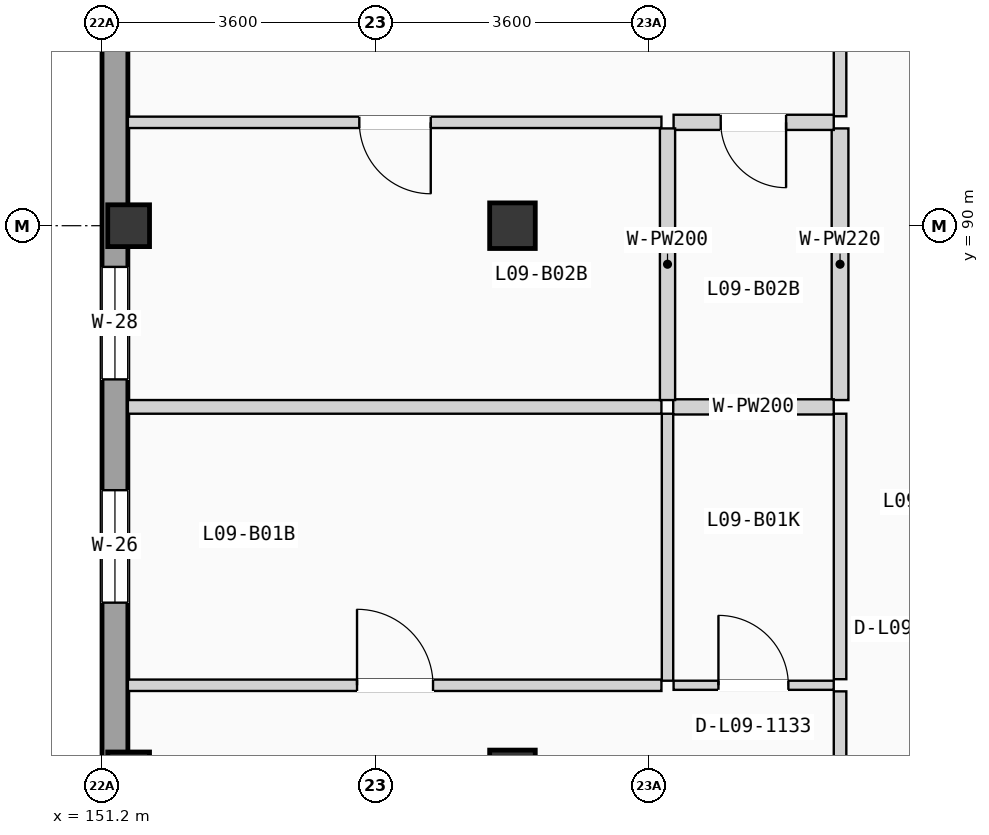
"""IFC4 building model, lengths in metres.
Left out: names, types, materials, properties, quantities, classifications, styles, units other than length and angle.
Written with IfcOpenShell. Run it as: python <this file> out.ifc"""

import sys

from ifc_helpers import new_model, si_unit, direction, frame, frame_2d, origin, origin_2d, place, context, subcontext, project, spatial, rectangle, extrude, element, fill, save


model = new_model("IFC4")
c1 = context("Model", 3, precision=1e-05, world=origin(), true_north=direction((0.0, 1.0)))
c2 = subcontext(c1, "Body", "Model", "MODEL_VIEW")
j1 = project(units=[si_unit("LENGTHUNIT", "METRE"), si_unit("PLANEANGLEUNIT", "RADIAN")], contexts=[c1])
p1 = place(None, origin())
s1 = spatial("IfcSite", under=j1, at=p1, CompositionType="ELEMENT")
p2 = place(p1, origin())
s2 = spatial("IfcBuilding", under=s1, at=p2, CompositionType="ELEMENT")
p3 = place(p2, frame((0.0, 0.0, 30.975)))
s3 = spatial("IfcBuildingStorey", under=s2, at=p3, CompositionType="ELEMENT", Elevation=30.975)
for number, where, z_axis, x_axis in (
    (1, (151.55, 82.8, 0.0), (0.0, 0.0, 1.0), (1.0, 0.0, 0.0)),
    (2, (151.55, 90.0, 0.0), (0.0, 0.0, 1.0), (1.0, 0.0, 0.0)),
):
    element("IfcColumn", number, at=place(p3, frame(where, z_axis=z_axis, x_axis=x_axis)), inside=s3, PredefinedType="COLUMN", context=c2, shape_type="SweptSolid", body=[
        extrude(rectangle(XDim=0.55, YDim=0.55, at=origin_2d()), origin(), (0.0, 0.0, 1.0), 3.15),
    ])
for number, where, z_axis, x_axis in (
    (3, (156.6, 82.8, 0.0), (0.0, 0.0, 1.0), (1.0, 0.0, 0.0)),
    (4, (156.6, 90.0, 0.0), (0.0, 0.0, 1.0), (1.0, 0.0, 0.0)),
):
    element("IfcColumn", number, at=place(p3, frame(where, z_axis=z_axis, x_axis=x_axis)), inside=s3, PredefinedType="COLUMN", context=c2, shape_type="SweptSolid", body=[
        extrude(rectangle(XDim=0.6, YDim=0.6, at=origin_2d()), origin(), (0.0, 0.0, 1.0), 3.15),
    ])
p4 = place(p3, frame((151.37, 68.74, 0.0), z_axis=(0.0, 0.0, 1.0), x_axis=(0.0, 1.0, 0.0)))
e5 = element("IfcWall", 5, at=p4, inside=s3, PredefinedType="SOLIDWALL", context=c2, shape_type="SweptSolid", body=[
    extrude(rectangle(XDim=49.72, YDim=0.34, at=frame_2d((24.86, 0.0))), origin(), (0.0, 0.0, 1.0), 2.9),
])
p5 = place(p4, frame((11.677, 0.0, 0.565)))
e6 = element("IfcOpeningElement", 6, at=p5, cuts=e5, PredefinedType="OPENING", context=c2, shape_type="SweptSolid", body=[
    extrude(rectangle(XDim=1.35, YDim=1.65, at=frame_2d((0.675, 0.825))), frame((0.0, 0.18, 0.0), z_axis=(0.0, -1.0, 0.0), x_axis=(1.0, 0.0, 0.0)), (0.0, 0.0, 1.0), 0.36),
])
p6 = place(p4, frame((8.532, 0.0, 0.85)))
e7 = element("IfcOpeningElement", 7, at=p6, cuts=e5, PredefinedType="OPENING", context=c2, shape_type="SweptSolid", body=[
    extrude(rectangle(XDim=0.95, YDim=1.2, at=frame_2d((0.475, 0.6))), frame((0.0, 0.18, 0.0), z_axis=(0.0, -1.0, 0.0), x_axis=(1.0, 0.0, 0.0)), (0.0, 0.0, 1.0), 0.36),
])
p7 = place(p4, frame((16.3, 0.0, 0.9)))
e8 = element("IfcOpeningElement", 8, at=p7, cuts=e5, PredefinedType="OPENING", context=c2, shape_type="SweptSolid", body=[
    extrude(rectangle(XDim=1.48, YDim=1.2, at=frame_2d((0.74, 0.6))), frame((0.0, 0.18, 0.0), z_axis=(0.0, -1.0, 0.0), x_axis=(1.0, 0.0, 0.0)), (0.0, 0.0, 1.0), 0.36),
])
p8 = place(p4, frame((24.12, 0.0, 0.865)))
e9 = element("IfcOpeningElement", 9, at=p8, cuts=e5, PredefinedType="OPENING", context=c2, shape_type="SweptSolid", body=[
    extrude(rectangle(XDim=1.48, YDim=1.35, at=frame_2d((0.74, 0.675))), frame((0.0, 0.18, 0.0), z_axis=(0.0, -1.0, 0.0), x_axis=(1.0, 0.0, 0.0)), (0.0, 0.0, 1.0), 0.36),
])
p9 = place(p4, frame((19.238, 0.0, 0.715)))
e10 = element("IfcOpeningElement", 10, at=p9, cuts=e5, PredefinedType="OPENING", context=c2, shape_type="SweptSolid", body=[
    extrude(rectangle(XDim=1.48, YDim=1.5, at=frame_2d((0.74, 0.75))), frame((0.0, 0.18, 0.0), z_axis=(0.0, -1.0, 0.0), x_axis=(1.0, 0.0, 0.0)), (0.0, 0.0, 1.0), 0.36),
])
p10 = place(p4, frame((29.002, 0.0, 0.565)))
e11 = element("IfcOpeningElement", 11, at=p10, cuts=e5, PredefinedType="OPENING", context=c2, shape_type="SweptSolid", body=[
    extrude(rectangle(XDim=1.48, YDim=1.65, at=frame_2d((0.74, 0.825))), frame((0.0, 0.18, 0.0), z_axis=(0.0, -1.0, 0.0), x_axis=(1.0, 0.0, 0.0)), (0.0, 0.0, 1.0), 0.36),
])
p11 = place(p4, frame((36.894, 0.0, 0.85)))
e12 = element("IfcOpeningElement", 12, at=p11, cuts=e5, PredefinedType="OPENING", context=c2, shape_type="SweptSolid", body=[
    extrude(rectangle(XDim=0.95, YDim=1.2, at=frame_2d((0.475, 0.6))), frame((0.0, 0.18, 0.0), z_axis=(0.0, -1.0, 0.0), x_axis=(1.0, 0.0, 0.0)), (0.0, 0.0, 1.0), 0.36),
])
p12 = place(p4, frame((31.881, 0.0, 0.9)))
e13 = element("IfcOpeningElement", 13, at=p12, cuts=e5, PredefinedType="OPENING", context=c2, shape_type="SweptSolid", body=[
    extrude(rectangle(XDim=1.6, YDim=1.2, at=frame_2d((0.8, 0.6))), frame((0.0, 0.18, 0.0), z_axis=(0.0, -1.0, 0.0), x_axis=(1.0, 0.0, 0.0)), (0.0, 0.0, 1.0), 0.36),
])
p13 = place(p4, frame((39.913, 0.0, 0.865)))
e14 = element("IfcOpeningElement", 14, at=p13, cuts=e5, PredefinedType="OPENING", context=c2, shape_type="SweptSolid", body=[
    extrude(rectangle(XDim=1.6, YDim=1.35, at=frame_2d((0.8, 0.675))), frame((0.0, 0.18, 0.0), z_axis=(0.0, -1.0, 0.0), x_axis=(1.0, 0.0, 0.0)), (0.0, 0.0, 1.0), 0.36),
])
p14 = place(p3, frame((160.91, 79.653, 0.0), z_axis=(0.0, 0.0, 1.0), x_axis=(0.0, 1.0, 0.0)))
e15 = element("IfcWall", 15, at=p14, inside=s3, PredefinedType="PARTITIONING", context=c2, shape_type="SweptSolid", body=[
    extrude(rectangle(XDim=4.22, YDim=0.165, at=frame_2d((2.11, 0.0))), origin(), (0.0, 0.0, 1.0), 2.87),
])
p15 = place(p14, frame((1.605, 0.0, 0.0)))
e16 = element("IfcOpeningElement", 16, at=p15, cuts=e15, PredefinedType="OPENING", context=c2, shape_type="SweptSolid", body=[
    extrude(rectangle(XDim=1.01, YDim=2.11, at=frame_2d((0.505, 1.055))), frame((0.0, 0.093, 0.0), z_axis=(0.0, -1.0, 0.0), x_axis=(1.0, 0.0, 0.0)), (0.0, 0.0, 1.0), 0.185),
])
p16 = place(p3, frame((160.91, 84.033, 0.0), z_axis=(0.0, 0.0, 1.0), x_axis=(0.0, 1.0, 0.0)))
e17 = element("IfcWall", 17, at=p16, inside=s3, PredefinedType="PARTITIONING", context=c2, shape_type="SweptSolid", body=[
    extrude(rectangle(XDim=3.493, YDim=0.165, at=frame_2d((1.747, 0.0))), origin(), (0.0, 0.0, 1.0), 2.87),
])
p17 = place(p3, frame((160.91, 91.44, 0.0), z_axis=(0.0, 0.0, 1.0), x_axis=(0.0, 1.0, 0.0)))
e18 = element("IfcWall", 18, at=p17, inside=s3, PredefinedType="PARTITIONING", context=c2, shape_type="SweptSolid", body=[
    extrude(rectangle(XDim=4.32, YDim=0.165, at=frame_2d((2.16, 0.0))), origin(), (0.0, 0.0, 1.0), 2.87),
])
p18 = place(p17, frame((1.655, 0.0, 0.0)))
e19 = element("IfcOpeningElement", 19, at=p18, cuts=e18, PredefinedType="OPENING", context=c2, shape_type="SweptSolid", body=[
    extrude(rectangle(XDim=1.01, YDim=2.11, at=frame_2d((0.505, 1.055))), frame((0.0, 0.093, 0.0), z_axis=(0.0, -1.0, 0.0), x_axis=(1.0, 0.0, 0.0)), (0.0, 0.0, 1.0), 0.185),
])
p19 = place(p3, frame((160.91, 87.706, 0.0), z_axis=(0.0, 0.0, 1.0), x_axis=(0.0, 1.0, 0.0)))
e20 = element("IfcWall", 20, at=p19, inside=s3, PredefinedType="PLUMBINGWALL", context=c2, shape_type="SweptSolid", body=[
    extrude(rectangle(XDim=3.574, YDim=0.22, at=frame_2d((1.787, 0.0))), origin(), (0.0, 0.0, 1.0), 2.87),
])
p20 = place(p3, frame((158.72, 83.953, 0.0), z_axis=(0.0, 0.0, 1.0), x_axis=(1.0, 0.0, 0.0)))
e21 = element("IfcWall", 21, at=p20, inside=s3, PredefinedType="PARTITIONING", context=c2, shape_type="SweptSolid", body=[
    extrude(rectangle(XDim=2.107, YDim=0.12, at=frame_2d((1.053, 0.0))), origin(), (0.0, 0.0, 1.0), 2.87),
])
p21 = place(p20, frame((0.59, 0.0, 0.0)))
e22 = element("IfcOpeningElement", 22, at=p21, cuts=e21, PredefinedType="OPENING", context=c2, shape_type="SweptSolid", body=[
    extrude(rectangle(XDim=0.92, YDim=2.02, at=frame_2d((0.46, 1.01))), frame((0.0, 0.07, 0.0), z_axis=(0.0, -1.0, 0.0), x_axis=(1.0, 0.0, 0.0)), (0.0, 0.0, 1.0), 0.14),
])
p22 = place(p3, frame((151.54, 83.953, 0.0), z_axis=(0.0, 0.0, 1.0), x_axis=(1.0, 0.0, 0.0)))
e23 = element("IfcWall", 23, at=p22, inside=s3, PredefinedType="PARTITIONING", context=c2, shape_type="SweptSolid", body=[
    extrude(rectangle(XDim=7.02, YDim=0.15, at=frame_2d((3.51, 0.0))), origin(), (0.0, 0.0, 1.0), 2.87),
])
p23 = place(p22, frame((3.015, 0.0, 0.0)))
e24 = element("IfcOpeningElement", 24, at=p23, cuts=e23, PredefinedType="OPENING", context=c2, shape_type="SweptSolid", body=[
    extrude(rectangle(XDim=1.0, YDim=2.06, at=frame_2d((0.5, 1.03))), frame((0.0, 0.085, 0.0), z_axis=(0.0, -1.0, 0.0), x_axis=(1.0, 0.0, 0.0)), (0.0, 0.0, 1.0), 0.17),
])
p24 = place(p3, frame((158.64, 84.013, 0.0), z_axis=(0.0, 0.0, 1.0), x_axis=(0.0, 1.0, 0.0)))
e25 = element("IfcWall", 25, at=p24, inside=s3, PredefinedType="PARTITIONING", context=c2, shape_type="SweptSolid", body=[
    extrude(rectangle(XDim=3.513, YDim=0.15, at=frame_2d((1.756, 0.0))), origin(), (0.0, 0.0, 1.0), 2.87),
])
p25 = place(p3, frame((158.715, 87.616, 0.0), z_axis=(0.0, 0.0, 1.0), x_axis=(1.0, 0.0, 0.0)))
e26 = element("IfcWall", 26, at=p25, inside=s3, PredefinedType="PLUMBINGWALL", context=c2, shape_type="SweptSolid", body=[
    extrude(rectangle(XDim=2.112, YDim=0.2, at=frame_2d((1.056, 0.0))), origin(), (0.0, 0.0, 1.0), 2.87),
])
p26 = place(p3, frame((151.54, 87.616, 0.0), z_axis=(0.0, 0.0, 1.0), x_axis=(1.0, 0.0, 0.0)))
e27 = element("IfcWall", 27, at=p26, inside=s3, PredefinedType="PARTITIONING", context=c2, shape_type="SweptSolid", body=[
    extrude(rectangle(XDim=7.02, YDim=0.18, at=frame_2d((3.51, 0.0))), origin(), (0.0, 0.0, 1.0), 2.87),
])
p27 = place(p3, frame((158.72, 91.36, 0.0), z_axis=(0.0, 0.0, 1.0), x_axis=(1.0, 0.0, 0.0)))
e28 = element("IfcWall", 28, at=p27, inside=s3, PredefinedType="PLUMBINGWALL", context=c2, shape_type="SweptSolid", body=[
    extrude(rectangle(XDim=2.107, YDim=0.2, at=frame_2d((1.053, 0.0))), origin(), (0.0, 0.0, 1.0), 2.87),
])
p28 = place(p27, frame((0.62, 0.0, 0.0)))
e29 = element("IfcOpeningElement", 29, at=p28, cuts=e28, PredefinedType="OPENING", context=c2, shape_type="SweptSolid", body=[
    extrude(rectangle(XDim=0.86, YDim=2.0, at=frame_2d((0.43, 1.0))), frame((0.0, 0.11, 0.0), z_axis=(0.0, -1.0, 0.0), x_axis=(1.0, 0.0, 0.0)), (0.0, 0.0, 1.0), 0.22),
])
p29 = place(p3, frame((151.54, 91.36, 0.0), z_axis=(0.0, 0.0, 1.0), x_axis=(1.0, 0.0, 0.0)))
e30 = element("IfcWall", 30, at=p29, inside=s3, PredefinedType="PARTITIONING", context=c2, shape_type="SweptSolid", body=[
    extrude(rectangle(XDim=7.02, YDim=0.15, at=frame_2d((3.51, 0.0))), origin(), (0.0, 0.0, 1.0), 2.87),
])
p30 = place(p29, frame((3.045, 0.0, 0.0)))
e31 = element("IfcOpeningElement", 31, at=p30, cuts=e30, PredefinedType="OPENING", context=c2, shape_type="SweptSolid", body=[
    extrude(rectangle(XDim=0.94, YDim=2.06, at=frame_2d((0.47, 1.03))), frame((0.0, 0.085, 0.0), z_axis=(0.0, -1.0, 0.0), x_axis=(1.0, 0.0, 0.0)), (0.0, 0.0, 1.0), 0.17),
])
p31 = place(p3, frame((158.64, 87.706, 0.0), z_axis=(0.0, 0.0, 1.0), x_axis=(0.0, 1.0, 0.0)))
e32 = element("IfcWall", 32, at=p31, inside=s3, PredefinedType="PLUMBINGWALL", context=c2, shape_type="SweptSolid", body=[
    extrude(rectangle(XDim=3.574, YDim=0.2, at=frame_2d((1.787, 0.0))), origin(), (0.0, 0.0, 1.0), 2.87),
])
p32 = place(p7, origin())
e33 = element("IfcWindow", 33, at=p32, inside=s3, PartitioningType="SINGLE_PANEL", PredefinedType="WINDOW", context=c2, shape_type="SweptSolid", body=[
    extrude(rectangle(XDim=1.48, YDim=1.2, at=frame_2d((0.74, 0.6))), frame((0.0, 0.03, 0.0), z_axis=(0.0, -1.0, 0.0), x_axis=(1.0, 0.0, 0.0)), (0.0, 0.0, 1.0), 0.06),
])
fill(e8, e33)
p33 = place(p9, origin())
e34 = element("IfcWindow", 34, at=p33, inside=s3, PartitioningType="SINGLE_PANEL", PredefinedType="WINDOW", context=c2, shape_type="SweptSolid", body=[
    extrude(rectangle(XDim=1.48, YDim=1.5, at=frame_2d((0.74, 0.75))), frame((0.0, 0.03, 0.0), z_axis=(0.0, -1.0, 0.0), x_axis=(1.0, 0.0, 0.0)), (0.0, 0.0, 1.0), 0.06),
])
fill(e10, e34)
p34 = place(p21, origin())
e35 = element("IfcDoor", 35, at=p34, inside=s3, OperationType="SINGLE_SWING_LEFT", PredefinedType="DOOR", context=c2, shape_type="SweptSolid", body=[
    extrude(rectangle(XDim=0.92, YDim=2.02, at=frame_2d((0.46, 1.01))), frame((0.0, 0.025, 0.0), z_axis=(0.0, -1.0, 0.0), x_axis=(1.0, 0.0, 0.0)), (0.0, 0.0, 1.0), 0.05),
])
fill(e22, e35)
p35 = place(p23, origin())
e36 = element("IfcDoor", 36, at=p35, inside=s3, OperationType="SINGLE_SWING_LEFT", PredefinedType="DOOR", context=c2, shape_type="SweptSolid", body=[
    extrude(rectangle(XDim=1.0, YDim=2.06, at=frame_2d((0.5, 1.03))), frame((0.0, 0.025, 0.0), z_axis=(0.0, -1.0, 0.0), x_axis=(1.0, 0.0, 0.0)), (0.0, 0.0, 1.0), 0.05),
])
fill(e24, e36)
p36 = place(p28, frame((0.86, 0.0, 0.0), z_axis=(0.0, 0.0, 1.0), x_axis=(-1.0, 0.0, 0.0)))
e37 = element("IfcDoor", 37, at=p36, inside=s3, OperationType="SINGLE_SWING_RIGHT", PredefinedType="DOOR", context=c2, shape_type="SweptSolid", body=[
    extrude(rectangle(XDim=0.86, YDim=2.0, at=frame_2d((0.43, 1.0))), frame((0.0, 0.025, 0.0), z_axis=(0.0, -1.0, 0.0), x_axis=(1.0, 0.0, 0.0)), (0.0, 0.0, 1.0), 0.05),
])
fill(e29, e37)
p37 = place(p30, frame((0.94, 0.0, 0.0), z_axis=(0.0, 0.0, 1.0), x_axis=(-1.0, 0.0, 0.0)))
e38 = element("IfcDoor", 38, at=p37, inside=s3, OperationType="SINGLE_SWING_RIGHT", PredefinedType="DOOR", context=c2, shape_type="SweptSolid", body=[
    extrude(rectangle(XDim=0.94, YDim=2.06, at=frame_2d((0.47, 1.03))), frame((0.0, 0.025, 0.0), z_axis=(0.0, -1.0, 0.0), x_axis=(1.0, 0.0, 0.0)), (0.0, 0.0, 1.0), 0.05),
])
fill(e31, e38)
save(model, sys.argv[1])
